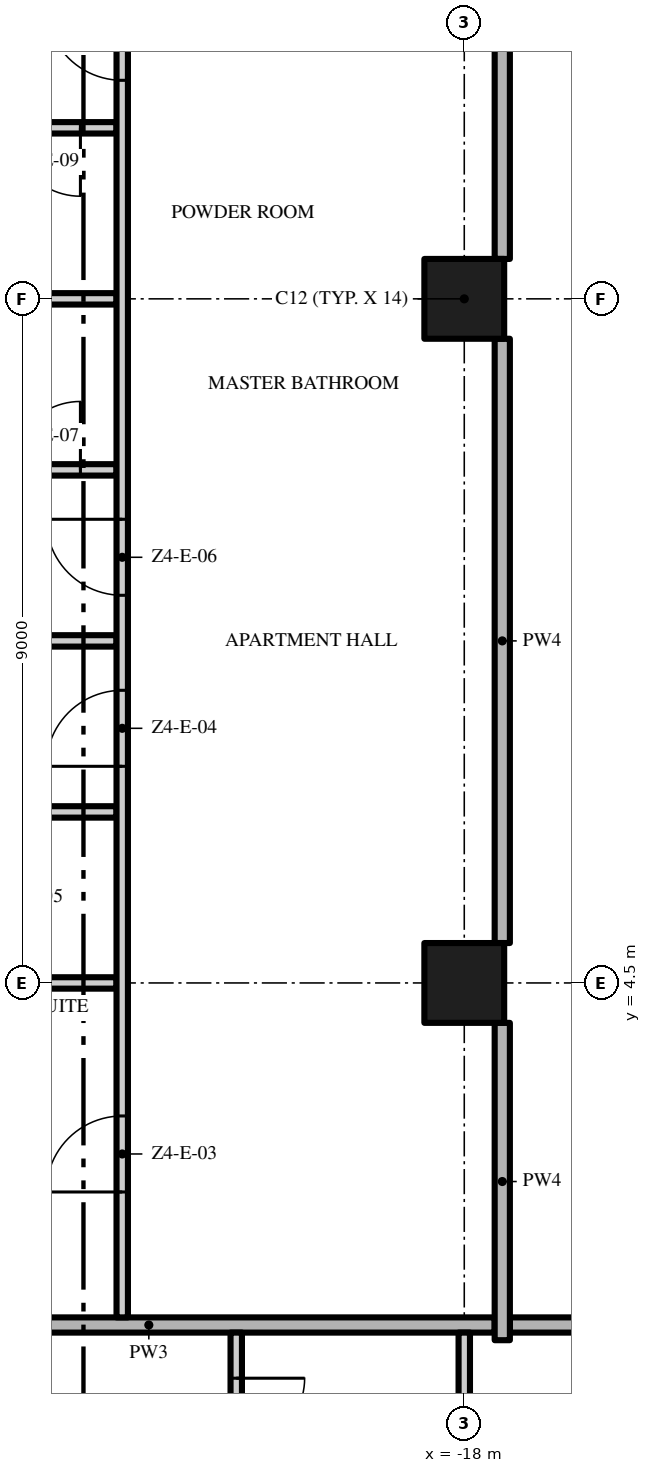
"""IFC4 building model, lengths in metres.
Left out: names, types, materials, properties, quantities, classifications, styles, units other than length and angle.
Written with IfcOpenShell. Run it as: python <this file> out.ifc"""

import sys

from ifc_helpers import new_model, si_unit, direction, frame, frame_2d, origin, origin_2d, place, context, subcontext, project, spatial, rectangle, extrude, element, fill, save


model = new_model("IFC4")
c1 = context("Model", 3, precision=1e-05, world=origin(), true_north=direction((0.0, 1.0)))
c2 = subcontext(c1, "Body", "Model", "MODEL_VIEW")
j1 = project(units=[si_unit("LENGTHUNIT", "METRE"), si_unit("PLANEANGLEUNIT", "RADIAN")], contexts=[c1])
p1 = place(None, origin())
s1 = spatial("IfcSite", under=j1, at=p1, CompositionType="ELEMENT")
p2 = place(p1, origin())
s2 = spatial("IfcBuilding", under=s1, at=p2, CompositionType="ELEMENT")
p3 = place(p2, frame((0.0, 0.0, 226.2)))
s3 = spatial("IfcBuildingStorey", under=s2, at=p3, CompositionType="ELEMENT", Elevation=226.2)
for number, where, z_axis, x_axis in (
    (1, (-18.0, 13.5, 0.0), (0.0, 0.0, 1.0), (1.0, 0.0, 0.0)),
    (2, (-18.0, 4.5, 0.0), (0.0, 0.0, 1.0), (1.0, 0.0, 0.0)),
):
    element("IfcColumn", number, at=place(p3, frame(where, z_axis=z_axis, x_axis=x_axis)), inside=s3, PredefinedType="COLUMN", context=c2, shape_type="SweptSolid", body=[
        extrude(rectangle(XDim=1.05, YDim=1.05, at=origin_2d()), origin(), (0.0, 0.0, 1.0), 3.5),
    ])
p4 = place(p3, frame((-17.4, 0.0, 0.0), z_axis=(0.0, 0.0, 1.0), x_axis=(1.0, 0.0, 0.0)))
e3 = element("IfcWall", 3, at=p4, inside=s3, PredefinedType="PARTITIONING", context=c2, shape_type="SweptSolid", body=[
    extrude(rectangle(XDim=12.8, YDim=0.2, at=frame_2d((6.4, 0.0))), origin(), (0.0, 0.0, 1.0), 3.5),
])
p5 = place(p3, frame((-26.7, 0.0, 0.0), z_axis=(0.0, 0.0, 1.0), x_axis=(1.0, 0.0, 0.0)))
e4 = element("IfcWall", 4, at=p5, inside=s3, PredefinedType="PARTITIONING", context=c2, shape_type="SweptSolid", body=[
    extrude(rectangle(XDim=9.1, YDim=0.2, at=frame_2d((4.55, 0.0))), origin(), (0.0, 0.0, 1.0), 3.5),
])
p6 = place(p3, frame((-26.05, 4.5, 0.0), z_axis=(0.0, 0.0, 1.0), x_axis=(1.0, 0.0, 0.0)))
e5 = element("IfcWall", 5, at=p6, inside=s3, PredefinedType="PARTITIONING", context=c2, shape_type="SweptSolid", body=[
    extrude(rectangle(XDim=3.475, YDim=0.15, at=frame_2d((1.738, 0.0))), origin(), (0.0, 0.0, 1.0), 3.5),
])
p7 = place(p3, frame((-24.45, 6.75, 0.0), z_axis=(0.0, 0.0, 1.0), x_axis=(1.0, 0.0, 0.0)))
e6 = element("IfcWall", 6, at=p7, inside=s3, PredefinedType="PARTITIONING", context=c2, shape_type="SweptSolid", body=[
    extrude(rectangle(XDim=1.875, YDim=0.15, at=frame_2d((0.938, 0.0))), origin(), (0.0, 0.0, 1.0), 3.5),
])
p8 = place(p3, frame((-26.7, 9.0, 0.0), z_axis=(0.0, 0.0, 1.0), x_axis=(1.0, 0.0, 0.0)))
e7 = element("IfcWall", 7, at=p8, inside=s3, PredefinedType="PARTITIONING", context=c2, shape_type="SweptSolid", body=[
    extrude(rectangle(XDim=4.125, YDim=0.15, at=frame_2d((2.062, 0.0))), origin(), (0.0, 0.0, 1.0), 3.5),
])
p9 = place(p3, frame((-24.45, 11.25, 0.0), z_axis=(0.0, 0.0, 1.0), x_axis=(1.0, 0.0, 0.0)))
e8 = element("IfcWall", 8, at=p9, inside=s3, PredefinedType="PARTITIONING", context=c2, shape_type="SweptSolid", body=[
    extrude(rectangle(XDim=1.875, YDim=0.15, at=frame_2d((0.938, 0.0))), origin(), (0.0, 0.0, 1.0), 3.5),
])
p10 = place(p9, frame((0.5, 0.0, 0.0)))
e9 = element("IfcOpeningElement", 9, at=p10, cuts=e8, PredefinedType="OPENING", context=c2, shape_type="SweptSolid", body=[
    extrude(rectangle(XDim=0.9, YDim=2.1, at=frame_2d((0.45, 1.05))), frame((0.0, 0.085, 0.0), z_axis=(0.0, -1.0, 0.0), x_axis=(1.0, 0.0, 0.0)), (0.0, 0.0, 1.0), 0.17),
])
p11 = place(p3, frame((-24.45, 13.5, 0.0), z_axis=(0.0, 0.0, 1.0), x_axis=(1.0, 0.0, 0.0)))
e10 = element("IfcWall", 10, at=p11, inside=s3, PredefinedType="PARTITIONING", context=c2, shape_type="SweptSolid", body=[
    extrude(rectangle(XDim=1.875, YDim=0.15, at=frame_2d((0.938, 0.0))), origin(), (0.0, 0.0, 1.0), 3.5),
])
p12 = place(p3, frame((-22.575, 15.75, 0.0), z_axis=(0.0, 0.0, 1.0), x_axis=(-1.0, 0.0, 0.0)))
e11 = element("IfcWall", 11, at=p12, inside=s3, PredefinedType="PARTITIONING", context=c2, shape_type="SweptSolid", body=[
    extrude(rectangle(XDim=1.875, YDim=0.15, at=frame_2d((0.938, 0.0))), origin(), (0.0, 0.0, 1.0), 3.5),
])
p13 = place(p12, frame((0.475, 0.0, 0.0)))
e12 = element("IfcOpeningElement", 12, at=p13, cuts=e11, PredefinedType="OPENING", context=c2, shape_type="SweptSolid", body=[
    extrude(rectangle(XDim=0.9, YDim=2.1, at=frame_2d((0.45, 1.05))), frame((0.0, 0.085, 0.0), z_axis=(0.0, -1.0, 0.0), x_axis=(1.0, 0.0, 0.0)), (0.0, 0.0, 1.0), 0.17),
])
p14 = place(p3, frame((-22.5, 0.1, 0.0), z_axis=(0.0, 0.0, 1.0), x_axis=(0.0, 1.0, 0.0)))
e13 = element("IfcWall", 13, at=p14, inside=s3, PredefinedType="PARTITIONING", context=c2, shape_type="SweptSolid", body=[
    extrude(rectangle(XDim=17.425, YDim=0.15, at=frame_2d((8.713, 0.0))), origin(), (0.0, 0.0, 1.0), 3.5),
])
p15 = place(p14, frame((1.65, 0.0, 0.0)))
e14 = element("IfcOpeningElement", 14, at=p15, cuts=e13, PredefinedType="OPENING", context=c2, shape_type="SweptSolid", body=[
    extrude(rectangle(XDim=1.0, YDim=2.4, at=frame_2d((0.5, 1.2))), frame((0.0, 0.085, 0.0), z_axis=(0.0, -1.0, 0.0), x_axis=(1.0, 0.0, 0.0)), (0.0, 0.0, 1.0), 0.17),
])
p16 = place(p14, frame((7.25, 0.0, 0.0)))
e15 = element("IfcOpeningElement", 15, at=p16, cuts=e13, PredefinedType="OPENING", context=c2, shape_type="SweptSolid", body=[
    extrude(rectangle(XDim=1.0, YDim=2.4, at=frame_2d((0.5, 1.2))), frame((0.0, 0.085, 0.0), z_axis=(0.0, -1.0, 0.0), x_axis=(1.0, 0.0, 0.0)), (0.0, 0.0, 1.0), 0.17),
])
p17 = place(p14, frame((9.5, 0.0, 0.0)))
e16 = element("IfcOpeningElement", 16, at=p17, cuts=e13, PredefinedType="OPENING", context=c2, shape_type="SweptSolid", body=[
    extrude(rectangle(XDim=1.0, YDim=2.4, at=frame_2d((0.5, 1.2))), frame((0.0, 0.085, 0.0), z_axis=(0.0, -1.0, 0.0), x_axis=(1.0, 0.0, 0.0)), (0.0, 0.0, 1.0), 0.17),
])
p18 = place(p14, frame((16.275, 0.0, 0.0)))
e17 = element("IfcOpeningElement", 17, at=p18, cuts=e13, PredefinedType="OPENING", context=c2, shape_type="SweptSolid", body=[
    extrude(rectangle(XDim=1.0, YDim=2.4, at=frame_2d((0.5, 1.2))), frame((0.0, 0.085, 0.0), z_axis=(0.0, -1.0, 0.0), x_axis=(1.0, 0.0, 0.0)), (0.0, 0.0, 1.0), 0.17),
])
p19 = place(p3, frame((-21.0, -0.1, 0.0), z_axis=(0.0, 0.0, 1.0), x_axis=(0.0, -1.0, 0.0)))
e18 = element("IfcWall", 18, at=p19, inside=s3, PredefinedType="PARTITIONING", context=c2, shape_type="SweptSolid", body=[
    extrude(rectangle(XDim=2.225, YDim=0.15, at=frame_2d((1.113, 0.0))), origin(), (0.0, 0.0, 1.0), 3.5),
])
p20 = place(p19, frame((0.6, 0.0, 0.0)))
e19 = element("IfcOpeningElement", 19, at=p20, cuts=e18, PredefinedType="OPENING", context=c2, shape_type="SweptSolid", body=[
    extrude(rectangle(XDim=0.9, YDim=2.1, at=frame_2d((0.45, 1.05))), frame((0.0, 0.085, 0.0), z_axis=(0.0, -1.0, 0.0), x_axis=(1.0, 0.0, 0.0)), (0.0, 0.0, 1.0), 0.17),
])
p21 = place(p3, frame((-18.0, -3.975, 0.0), z_axis=(0.0, 0.0, 1.0), x_axis=(0.0, 1.0, 0.0)))
e20 = element("IfcWall", 20, at=p21, inside=s3, PredefinedType="PARTITIONING", context=c2, shape_type="SweptSolid", body=[
    extrude(rectangle(XDim=3.875, YDim=0.15, at=frame_2d((1.938, 0.0))), origin(), (0.0, 0.0, 1.0), 3.5),
])
p22 = place(p21, frame((0.15, 0.0, 0.0)))
e21 = element("IfcOpeningElement", 21, at=p22, cuts=e20, PredefinedType="OPENING", context=c2, shape_type="SweptSolid", body=[
    extrude(rectangle(XDim=1.0, YDim=2.4, at=frame_2d((0.5, 1.2))), frame((0.0, 0.085, 0.0), z_axis=(0.0, -1.0, 0.0), x_axis=(1.0, 0.0, 0.0)), (0.0, 0.0, 1.0), 0.17),
])
p23 = place(p3, frame((-17.5, -0.2, 0.0), z_axis=(0.0, 0.0, 1.0), x_axis=(0.0, 1.0, 0.0)))
e22 = element("IfcWall", 22, at=p23, inside=s3, PredefinedType="PARTITIONING", context=c2, shape_type="SweptSolid", body=[
    extrude(rectangle(XDim=4.175, YDim=0.2, at=frame_2d((2.087, 0.0))), origin(), (0.0, 0.0, 1.0), 3.5),
])
p24 = place(p3, frame((-17.5, 5.025, 0.0), z_axis=(0.0, 0.0, 1.0), x_axis=(0.0, 1.0, 0.0)))
e23 = element("IfcWall", 23, at=p24, inside=s3, PredefinedType="PARTITIONING", context=c2, shape_type="SweptSolid", body=[
    extrude(rectangle(XDim=7.95, YDim=0.2, at=frame_2d((3.975, 0.0))), origin(), (0.0, 0.0, 1.0), 3.5),
])
p25 = place(p3, frame((-17.5, 14.025, 0.0), z_axis=(0.0, 0.0, 1.0), x_axis=(0.0, 1.0, 0.0)))
e24 = element("IfcWall", 24, at=p25, inside=s3, PredefinedType="PARTITIONING", context=c2, shape_type="SweptSolid", body=[
    extrude(rectangle(XDim=7.525, YDim=0.2, at=frame_2d((3.763, 0.0))), origin(), (0.0, 0.0, 1.0), 3.5),
])
p26 = place(p25, frame((3.375, 0.0, 0.0)))
e25 = element("IfcOpeningElement", 25, at=p26, cuts=e24, PredefinedType="OPENING", context=c2, shape_type="SweptSolid", body=[
    extrude(rectangle(XDim=1.2, YDim=2.4, at=frame_2d((0.6, 1.2))), frame((0.0, 0.11, 0.0), z_axis=(0.0, -1.0, 0.0), x_axis=(1.0, 0.0, 0.0)), (0.0, 0.0, 1.0), 0.22),
])
p27 = place(p15, origin())
e26 = element("IfcDoor", 26, at=p27, inside=s3, OperationType="SINGLE_SWING_LEFT", PredefinedType="DOOR", context=c2, shape_type="SweptSolid", body=[
    extrude(rectangle(XDim=1.0, YDim=2.4, at=frame_2d((0.5, 1.2))), frame((0.0, 0.025, 0.0), z_axis=(0.0, -1.0, 0.0), x_axis=(1.0, 0.0, 0.0)), (0.0, 0.0, 1.0), 0.05),
])
fill(e14, e26)
p28 = place(p16, origin())
e27 = element("IfcDoor", 27, at=p28, inside=s3, OperationType="SINGLE_SWING_LEFT", PredefinedType="DOOR", context=c2, shape_type="SweptSolid", body=[
    extrude(rectangle(XDim=1.0, YDim=2.4, at=frame_2d((0.5, 1.2))), frame((0.0, 0.025, 0.0), z_axis=(0.0, -1.0, 0.0), x_axis=(1.0, 0.0, 0.0)), (0.0, 0.0, 1.0), 0.05),
])
fill(e15, e27)
p29 = place(p17, origin())
e28 = element("IfcDoor", 28, at=p29, inside=s3, OperationType="SINGLE_SWING_RIGHT", PredefinedType="DOOR", context=c2, shape_type="SweptSolid", body=[
    extrude(rectangle(XDim=1.0, YDim=2.4, at=frame_2d((0.5, 1.2))), frame((0.0, 0.025, 0.0), z_axis=(0.0, -1.0, 0.0), x_axis=(1.0, 0.0, 0.0)), (0.0, 0.0, 1.0), 0.05),
])
fill(e16, e28)
p30 = place(p10, origin())
e29 = element("IfcDoor", 29, at=p30, inside=s3, OperationType="SINGLE_SWING_RIGHT", PredefinedType="DOOR", context=c2, shape_type="SweptSolid", body=[
    extrude(rectangle(XDim=0.9, YDim=2.1, at=frame_2d((0.45, 1.05))), frame((0.0, 0.025, 0.0), z_axis=(0.0, -1.0, 0.0), x_axis=(1.0, 0.0, 0.0)), (0.0, 0.0, 1.0), 0.05),
])
fill(e9, e29)
p31 = place(p18, origin())
e30 = element("IfcDoor", 30, at=p31, inside=s3, OperationType="SINGLE_SWING_RIGHT", PredefinedType="DOOR", context=c2, shape_type="SweptSolid", body=[
    extrude(rectangle(XDim=1.0, YDim=2.4, at=frame_2d((0.5, 1.2))), frame((0.0, 0.025, 0.0), z_axis=(0.0, -1.0, 0.0), x_axis=(1.0, 0.0, 0.0)), (0.0, 0.0, 1.0), 0.05),
])
fill(e17, e30)
p32 = place(p13, origin())
e31 = element("IfcDoor", 31, at=p32, inside=s3, OperationType="SINGLE_SWING_LEFT", PredefinedType="DOOR", context=c2, shape_type="SweptSolid", body=[
    extrude(rectangle(XDim=0.9, YDim=2.1, at=frame_2d((0.45, 1.05))), frame((0.0, 0.025, 0.0), z_axis=(0.0, -1.0, 0.0), x_axis=(1.0, 0.0, 0.0)), (0.0, 0.0, 1.0), 0.05),
])
fill(e12, e31)
p33 = place(p20, origin())
e32 = element("IfcDoor", 32, at=p33, inside=s3, OperationType="SINGLE_SWING_LEFT", PredefinedType="DOOR", context=c2, shape_type="SweptSolid", body=[
    extrude(rectangle(XDim=0.9, YDim=2.1, at=frame_2d((0.45, 1.05))), frame((0.0, 0.025, 0.0), z_axis=(0.0, -1.0, 0.0), x_axis=(1.0, 0.0, 0.0)), (0.0, 0.0, 1.0), 0.05),
])
fill(e19, e32)
save(model, sys.argv[1])
